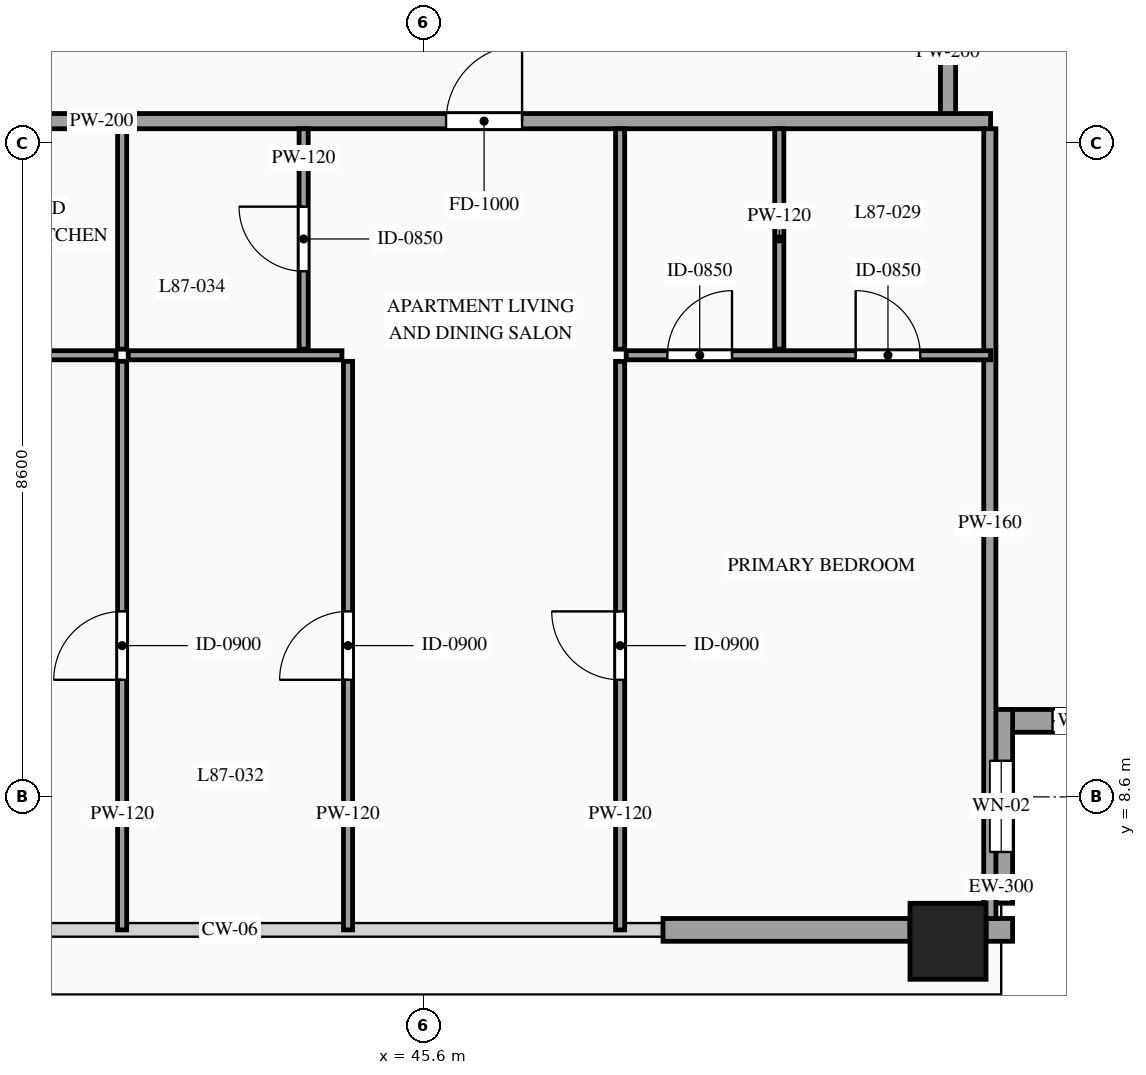
"""IFC4 building model, lengths in metres.
Left out: names, types, materials, properties, quantities, classifications, styles, units other than length and angle.
Written with IfcOpenShell. Run it as: python <this file> out.ifc"""

import sys

from ifc_helpers import new_model, si_unit, direction, frame, frame_2d, origin, origin_2d, place, context, subcontext, project, spatial, rectangle, hollow_rectangle, extrude, source, transform, mapped, element, fill, save


model = new_model("IFC4")
c1 = context("Model", 3, precision=1e-05, world=origin(), true_north=direction((0.0, 1.0)))
c2 = subcontext(c1, "Body", "Model", "MODEL_VIEW")
j1 = project(units=[si_unit("LENGTHUNIT", "METRE"), si_unit("PLANEANGLEUNIT", "RADIAN")], contexts=[c1])
p1 = place(None, origin())
s1 = spatial("IfcSite", under=j1, at=p1, CompositionType="ELEMENT")
p2 = place(p1, origin())
s2 = spatial("IfcBuilding", under=s1, at=p2, CompositionType="ELEMENT")
p3 = place(p2, frame((0.0, 0.0, 325.2)))
s3 = spatial("IfcBuildingStorey", under=s2, at=p3, CompositionType="ELEMENT", Elevation=325.2)
m1 = source(origin(), c2, "Body", "SweptSolid", [
    extrude(hollow_rectangle(XDim=1.0, YDim=1.0, WallThickness=0.048, at=origin_2d()), origin(), (0.0, 0.0, 1.0), 3.5),
])
p4 = place(p3, frame((52.5, 6.7, 0.0), z_axis=(0.0, 0.0, 1.0), x_axis=(1.0, 0.0, 0.0)))
e1 = element("IfcColumn", 1, at=p4, inside=s3, PredefinedType="COLUMN", context=c2, shape_type="MappedRepresentation", body=[
    mapped(m1, transform((0.0, 0.0, 0.0), scale=1.0)),
])
p5 = place(p3, frame((53.05, 9.6, 0.0), z_axis=(0.0, 0.0, 1.0), x_axis=(1.0, 0.0, 0.0)))
e2 = element("IfcWall", 2, at=p5, inside=s3, PredefinedType="SOLIDWALL", context=c2, shape_type="SweptSolid", body=[
    extrude(rectangle(XDim=2.55, YDim=0.3, at=frame_2d((1.275, 0.0))), origin(), (0.0, 0.0, 1.0), 3.28),
])
p6 = place(p5, frame((0.825, 0.0, 0.85)))
e3 = element("IfcOpeningElement", 3, at=p6, cuts=e2, PredefinedType="OPENING", context=c2, shape_type="SweptSolid", body=[
    extrude(rectangle(XDim=0.9, YDim=1.5, at=frame_2d((0.45, 0.75))), frame((0.0, 0.165, 0.0), z_axis=(0.0, -1.0, 0.0), x_axis=(1.0, 0.0, 0.0)), (0.0, 0.0, 1.0), 0.33),
])
p7 = place(p3, frame((53.2, 7.2, 0.0), z_axis=(0.0, 0.0, 1.0), x_axis=(0.0, 1.0, 0.0)))
e4 = element("IfcWall", 4, at=p7, inside=s3, PredefinedType="SOLIDWALL", context=c2, shape_type="SweptSolid", body=[
    extrude(rectangle(XDim=2.55, YDim=0.3, at=frame_2d((1.275, 0.0))), origin(), (0.0, 0.0, 1.0), 3.28),
])
p8 = place(p7, frame((0.675, 0.0, 0.85)))
e5 = element("IfcOpeningElement", 5, at=p8, cuts=e4, PredefinedType="OPENING", context=c2, shape_type="SweptSolid", body=[
    extrude(rectangle(XDim=1.2, YDim=2.1, at=frame_2d((0.6, 1.05))), frame((0.0, 0.165, 0.0), z_axis=(0.0, -1.0, 0.0), x_axis=(1.0, 0.0, 0.0)), (0.0, 0.0, 1.0), 0.33),
])
m2 = source(origin(), c2, "Body", "SweptSolid", [
    extrude(rectangle(XDim=0.35, YDim=0.3, at=frame_2d((0.175, 0.0))), origin(), (0.0, 0.0, 1.0), 3.28),
])
p9 = place(p3, frame((53.0, 6.85, 0.0), z_axis=(0.0, 0.0, 1.0), x_axis=(1.0, 0.0, 0.0)))
e6 = element("IfcWall", 6, at=p9, inside=s3, PredefinedType="SOLIDWALL", context=c2, shape_type="MappedRepresentation", body=[
    mapped(m2, transform((0.0, 0.0, 0.0), scale=1.0)),
])
m3 = source(origin(), c2, "Body", "SweptSolid", [
    extrude(rectangle(XDim=3.25, YDim=0.3, at=frame_2d((1.625, 0.0))), origin(), (0.0, 0.0, 1.0), 2.885),
])
p10 = place(p3, frame((48.75, 6.85, 0.0), z_axis=(0.0, 0.0, 1.0), x_axis=(1.0, 0.0, 0.0)))
e7 = element("IfcWall", 7, at=p10, inside=s3, PredefinedType="SOLIDWALL", context=c2, shape_type="MappedRepresentation", body=[
    mapped(m3, transform((0.0, 0.0, 0.0), scale=1.0)),
])
m4 = source(origin(), c2, "Body", "SweptSolid", [
    extrude(rectangle(XDim=1.7, YDim=0.2, at=frame_2d((0.85, 0.0))), origin(), (0.0, 0.0, 1.0), 3.28),
])
p11 = place(p3, frame((52.5, 17.55, 0.0), z_axis=(0.0, 0.0, 1.0), x_axis=(0.0, 1.0, 0.0)))
e8 = element("IfcWall", 8, at=p11, inside=s3, PredefinedType="PARTITIONING", context=c2, shape_type="MappedRepresentation", body=[
    mapped(m4, transform((0.0, 0.0, 0.0), scale=1.0)),
])
p12 = place(p3, frame((37.08, 17.49, 0.0), z_axis=(0.0, 0.0, 1.0), x_axis=(1.0, 0.0, 0.0)))
e9 = element("IfcWall", 9, at=p12, inside=s3, PredefinedType="PARTITIONING", context=c2, shape_type="SweptSolid", body=[
    extrude(rectangle(XDim=15.98, YDim=0.2, at=frame_2d((7.99, 0.0))), origin(), (0.0, 0.0, 1.0), 3.28),
])
p13 = place(p12, frame((8.816, 0.0, 0.0)))
e10 = element("IfcOpeningElement", 10, at=p13, cuts=e9, PredefinedType="OPENING", context=c2, shape_type="SweptSolid", body=[
    extrude(rectangle(XDim=1.0, YDim=2.2, at=frame_2d((0.5, 1.1))), frame((0.0, 0.115, 0.0), z_axis=(0.0, -1.0, 0.0), x_axis=(1.0, 0.0, 0.0)), (0.0, 0.0, 1.0), 0.23),
])
m5 = source(origin(), c2, "Body", "SweptSolid", [
    extrude(rectangle(XDim=10.39, YDim=0.16, at=frame_2d((5.195, 0.0))), origin(), (0.0, 0.0, 1.0), 3.28),
])
p14 = place(p3, frame((53.05, 7.0, 0.0), z_axis=(0.0, 0.0, 1.0), x_axis=(0.0, 1.0, 0.0)))
e11 = element("IfcWall", 11, at=p14, inside=s3, PredefinedType="PARTITIONING", context=c2, shape_type="MappedRepresentation", body=[
    mapped(m5, transform((0.0, 0.0, 0.0), scale=1.0)),
])
p15 = place(p3, frame((37.08, 14.41, 0.0), z_axis=(0.0, 0.0, 1.0), x_axis=(1.0, 0.0, 0.0)))
e12 = element("IfcWall", 12, at=p15, inside=s3, PredefinedType="PARTITIONING", context=c2, shape_type="SweptSolid", body=[
    extrude(rectangle(XDim=4.474, YDim=0.12, at=frame_2d((2.237, 0.0))), origin(), (0.0, 0.0, 1.0), 3.28),
])
p16 = place(p15, frame((1.812, 0.0, 0.0)))
e13 = element("IfcOpeningElement", 13, at=p16, cuts=e12, PredefinedType="OPENING", context=c2, shape_type="SweptSolid", body=[
    extrude(rectangle(XDim=0.85, YDim=2.1, at=frame_2d((0.425, 1.05))), frame((0.0, 0.075, 0.0), z_axis=(0.0, -1.0, 0.0), x_axis=(1.0, 0.0, 0.0)), (0.0, 0.0, 1.0), 0.15),
])
m6 = source(origin(), c2, "Body", "SweptSolid", [
    extrude(rectangle(XDim=2.9, YDim=0.12, at=frame_2d((1.45, 0.0))), origin(), (0.0, 0.0, 1.0), 3.28),
])
p17 = place(p3, frame((41.634, 14.49, 0.0), z_axis=(0.0, 0.0, 1.0), x_axis=(0.0, 1.0, 0.0)))
e14 = element("IfcWall", 14, at=p17, inside=s3, PredefinedType="PARTITIONING", context=c2, shape_type="MappedRepresentation", body=[
    mapped(m6, transform((0.0, 0.0, 0.0), scale=1.0)),
])
p18 = place(p3, frame((44.022, 14.49, 0.0), z_axis=(0.0, 0.0, 1.0), x_axis=(0.0, 1.0, 0.0)))
e15 = element("IfcWall", 15, at=p18, inside=s3, PredefinedType="PARTITIONING", context=c2, shape_type="SweptSolid", body=[
    extrude(rectangle(XDim=2.9, YDim=0.12, at=frame_2d((1.45, 0.0))), origin(), (0.0, 0.0, 1.0), 3.28),
])
p19 = place(p18, frame((1.025, 0.0, 0.0)))
e16 = element("IfcOpeningElement", 16, at=p19, cuts=e15, PredefinedType="OPENING", context=c2, shape_type="SweptSolid", body=[
    extrude(rectangle(XDim=0.85, YDim=2.1, at=frame_2d((0.425, 1.05))), frame((0.0, 0.075, 0.0), z_axis=(0.0, -1.0, 0.0), x_axis=(1.0, 0.0, 0.0)), (0.0, 0.0, 1.0), 0.15),
])
m7 = source(origin(), c2, "Body", "SweptSolid", [
    extrude(rectangle(XDim=2.9, YDim=0.12, at=frame_2d((1.45, 0.0))), origin(), (0.0, 0.0, 1.0), 2.825),
])
p20 = place(p3, frame((50.28, 14.49, 0.0), z_axis=(0.0, 0.0, 1.0), x_axis=(0.0, 1.0, 0.0)))
e17 = element("IfcWall", 17, at=p20, inside=s3, PredefinedType="PARTITIONING", context=c2, shape_type="MappedRepresentation", body=[
    mapped(m7, transform((0.0, 0.0, 0.0), scale=1.0)),
])
p21 = place(p3, frame((48.186, 14.49, 0.0), z_axis=(0.0, 0.0, 1.0), x_axis=(0.0, 1.0, 0.0)))
e18 = element("IfcWall", 18, at=p21, inside=s3, PredefinedType="PARTITIONING", context=c2, shape_type="MappedRepresentation", body=[
    mapped(m6, transform((0.0, 0.0, 0.0), scale=1.0)),
])
p22 = place(p3, frame((41.634, 6.85, 0.0), z_axis=(0.0, 0.0, 1.0), x_axis=(0.0, 1.0, 0.0)))
e19 = element("IfcWall", 19, at=p22, inside=s3, PredefinedType="PARTITIONING", context=c2, shape_type="SweptSolid", body=[
    extrude(rectangle(XDim=7.48, YDim=0.12, at=frame_2d((3.74, 0.0))), origin(), (0.0, 0.0, 1.0), 3.28),
])
p23 = place(p22, frame((3.29, 0.0, 0.0)))
e20 = element("IfcOpeningElement", 20, at=p23, cuts=e19, PredefinedType="OPENING", context=c2, shape_type="SweptSolid", body=[
    extrude(rectangle(XDim=0.9, YDim=2.15, at=frame_2d((0.45, 1.075))), frame((0.0, 0.075, 0.0), z_axis=(0.0, -1.0, 0.0), x_axis=(1.0, 0.0, 0.0)), (0.0, 0.0, 1.0), 0.15),
])
p24 = place(p3, frame((48.266, 14.41, 0.0), z_axis=(0.0, 0.0, 1.0), x_axis=(1.0, 0.0, 0.0)))
e21 = element("IfcWall", 21, at=p24, inside=s3, PredefinedType="PARTITIONING", context=c2, shape_type="SweptSolid", body=[
    extrude(rectangle(XDim=4.794, YDim=0.12, at=frame_2d((2.397, 0.0))), origin(), (0.0, 0.0, 1.0), 3.28),
])
p25 = place(p24, frame((3.019, 0.0, 0.0)))
e22 = element("IfcOpeningElement", 22, at=p25, cuts=e21, PredefinedType="OPENING", context=c2, shape_type="SweptSolid", body=[
    extrude(rectangle(XDim=0.85, YDim=2.1, at=frame_2d((0.425, 1.05))), frame((0.0, 0.075, 0.0), z_axis=(0.0, -1.0, 0.0), x_axis=(1.0, 0.0, 0.0)), (0.0, 0.0, 1.0), 0.15),
])
p26 = place(p24, frame((0.542, 0.0, 0.0)))
e23 = element("IfcOpeningElement", 23, at=p26, cuts=e21, PredefinedType="OPENING", context=c2, shape_type="SweptSolid", body=[
    extrude(rectangle(XDim=0.85, YDim=2.1, at=frame_2d((0.425, 1.05))), frame((0.0, 0.075, 0.0), z_axis=(0.0, -1.0, 0.0), x_axis=(1.0, 0.0, 0.0)), (0.0, 0.0, 1.0), 0.15),
])
p27 = place(p3, frame((48.186, 6.85, 0.0), z_axis=(0.0, 0.0, 1.0), x_axis=(0.0, 1.0, 0.0)))
e24 = element("IfcWall", 24, at=p27, inside=s3, PredefinedType="PARTITIONING", context=c2, shape_type="SweptSolid", body=[
    extrude(rectangle(XDim=7.48, YDim=0.12, at=frame_2d((3.74, 0.0))), origin(), (0.0, 0.0, 1.0), 3.28),
])
p28 = place(p27, frame((3.29, 0.0, 0.0)))
e25 = element("IfcOpeningElement", 25, at=p28, cuts=e24, PredefinedType="OPENING", context=c2, shape_type="SweptSolid", body=[
    extrude(rectangle(XDim=0.9, YDim=2.15, at=frame_2d((0.45, 1.075))), frame((0.0, 0.075, 0.0), z_axis=(0.0, -1.0, 0.0), x_axis=(1.0, 0.0, 0.0)), (0.0, 0.0, 1.0), 0.15),
])
m8 = source(origin(), c2, "Body", "SweptSolid", [
    extrude(rectangle(XDim=2.812, YDim=0.12, at=frame_2d((1.406, 0.0))), origin(), (0.0, 0.0, 1.0), 3.28),
])
p29 = place(p3, frame((41.714, 14.41, 0.0), z_axis=(0.0, 0.0, 1.0), x_axis=(1.0, 0.0, 0.0)))
e26 = element("IfcWall", 26, at=p29, inside=s3, PredefinedType="PARTITIONING", context=c2, shape_type="MappedRepresentation", body=[
    mapped(m8, transform((0.0, 0.0, 0.0), scale=1.0)),
])
p30 = place(p3, frame((44.606, 6.85, 0.0), z_axis=(0.0, 0.0, 1.0), x_axis=(0.0, 1.0, 0.0)))
e27 = element("IfcWall", 27, at=p30, inside=s3, PredefinedType="PARTITIONING", context=c2, shape_type="SweptSolid", body=[
    extrude(rectangle(XDim=7.48, YDim=0.12, at=frame_2d((3.74, 0.0))), origin(), (0.0, 0.0, 1.0), 3.28),
])
p31 = place(p30, frame((3.29, 0.0, 0.0)))
e28 = element("IfcOpeningElement", 28, at=p31, cuts=e27, PredefinedType="OPENING", context=c2, shape_type="SweptSolid", body=[
    extrude(rectangle(XDim=0.9, YDim=2.15, at=frame_2d((0.45, 1.075))), frame((0.0, 0.075, 0.0), z_axis=(0.0, -1.0, 0.0), x_axis=(1.0, 0.0, 0.0)), (0.0, 0.0, 1.0), 0.15),
])
m9 = source(origin(), c2, "Body", "SweptSolid", [
    extrude(rectangle(XDim=0.9, YDim=1.5, at=frame_2d((0.45, 0.75))), frame((0.0, 0.03, 0.0), z_axis=(0.0, -1.0, 0.0), x_axis=(1.0, 0.0, 0.0)), (0.0, 0.0, 1.0), 0.06),
])
p32 = place(p6, origin())
e29 = element("IfcWindow", 29, at=p32, inside=s3, PartitioningType="SINGLE_PANEL", PredefinedType="WINDOW", context=c2, shape_type="MappedRepresentation", body=[
    mapped(m9, transform((0.0, 0.0, 0.0), scale=1.0)),
])
fill(e3, e29)
m10 = source(origin(), c2, "Body", "SweptSolid", [
    extrude(rectangle(XDim=1.2, YDim=2.1, at=frame_2d((0.6, 1.05))), frame((0.0, 0.03, 0.0), z_axis=(0.0, -1.0, 0.0), x_axis=(1.0, 0.0, 0.0)), (0.0, 0.0, 1.0), 0.06),
])
p33 = place(p8, origin())
e30 = element("IfcWindow", 30, at=p33, inside=s3, PartitioningType="SINGLE_PANEL", PredefinedType="WINDOW", context=c2, shape_type="MappedRepresentation", body=[
    mapped(m10, transform((0.0, 0.0, 0.0), scale=1.0)),
])
fill(e5, e30)
m11 = source(origin(), c2, "Body", "SweptSolid", [
    extrude(rectangle(XDim=1.0, YDim=2.2, at=frame_2d((0.5, 1.1))), frame((0.0, 0.025, 0.0), z_axis=(0.0, -1.0, 0.0), x_axis=(1.0, 0.0, 0.0)), (0.0, 0.0, 1.0), 0.05),
])
p34 = place(p13, origin())
e31 = element("IfcDoor", 31, at=p34, inside=s3, OperationType="SINGLE_SWING_RIGHT", PredefinedType="DOOR", context=c2, shape_type="MappedRepresentation", body=[
    mapped(m11, transform((0.0, 0.0, 0.0), scale=1.0)),
])
fill(e10, e31)
m12 = source(origin(), c2, "Body", "SweptSolid", [
    extrude(rectangle(XDim=0.85, YDim=2.1, at=frame_2d((0.425, 1.05))), frame((0.0, 0.025, 0.0), z_axis=(0.0, -1.0, 0.0), x_axis=(1.0, 0.0, 0.0)), (0.0, 0.0, 1.0), 0.05),
])
p35 = place(p19, origin())
e32 = element("IfcDoor", 32, at=p35, inside=s3, OperationType="SINGLE_SWING_RIGHT", PredefinedType="DOOR", context=c2, shape_type="MappedRepresentation", body=[
    mapped(m12, transform((0.0, 0.0, 0.0), scale=1.0)),
])
fill(e16, e32)
p36 = place(p25, origin())
e33 = element("IfcDoor", 33, at=p36, inside=s3, OperationType="SINGLE_SWING_LEFT", PredefinedType="DOOR", context=c2, shape_type="MappedRepresentation", body=[
    mapped(m12, transform((0.0, 0.0, 0.0), scale=1.0)),
])
fill(e22, e33)
p37 = place(p26, origin())
e34 = element("IfcDoor", 34, at=p37, inside=s3, OperationType="SINGLE_SWING_RIGHT", PredefinedType="DOOR", context=c2, shape_type="MappedRepresentation", body=[
    mapped(m12, transform((0.0, 0.0, 0.0), scale=1.0)),
])
fill(e23, e34)
m13 = source(origin(), c2, "Body", "SweptSolid", [
    extrude(rectangle(XDim=0.9, YDim=2.15, at=frame_2d((0.45, 1.075))), frame((0.0, 0.025, 0.0), z_axis=(0.0, -1.0, 0.0), x_axis=(1.0, 0.0, 0.0)), (0.0, 0.0, 1.0), 0.05),
])
p38 = place(p23, origin())
e35 = element("IfcDoor", 35, at=p38, inside=s3, OperationType="SINGLE_SWING_LEFT", PredefinedType="DOOR", context=c2, shape_type="MappedRepresentation", body=[
    mapped(m13, transform((0.0, 0.0, 0.0), scale=1.0)),
])
fill(e20, e35)
p39 = place(p28, origin())
e36 = element("IfcDoor", 36, at=p39, inside=s3, OperationType="SINGLE_SWING_RIGHT", PredefinedType="DOOR", context=c2, shape_type="MappedRepresentation", body=[
    mapped(m13, transform((0.0, 0.0, 0.0), scale=1.0)),
])
fill(e25, e36)
p40 = place(p31, origin())
e37 = element("IfcDoor", 37, at=p40, inside=s3, OperationType="SINGLE_SWING_LEFT", PredefinedType="DOOR", context=c2, shape_type="MappedRepresentation", body=[
    mapped(m13, transform((0.0, 0.0, 0.0), scale=1.0)),
])
fill(e28, e37)
save(model, sys.argv[1])
